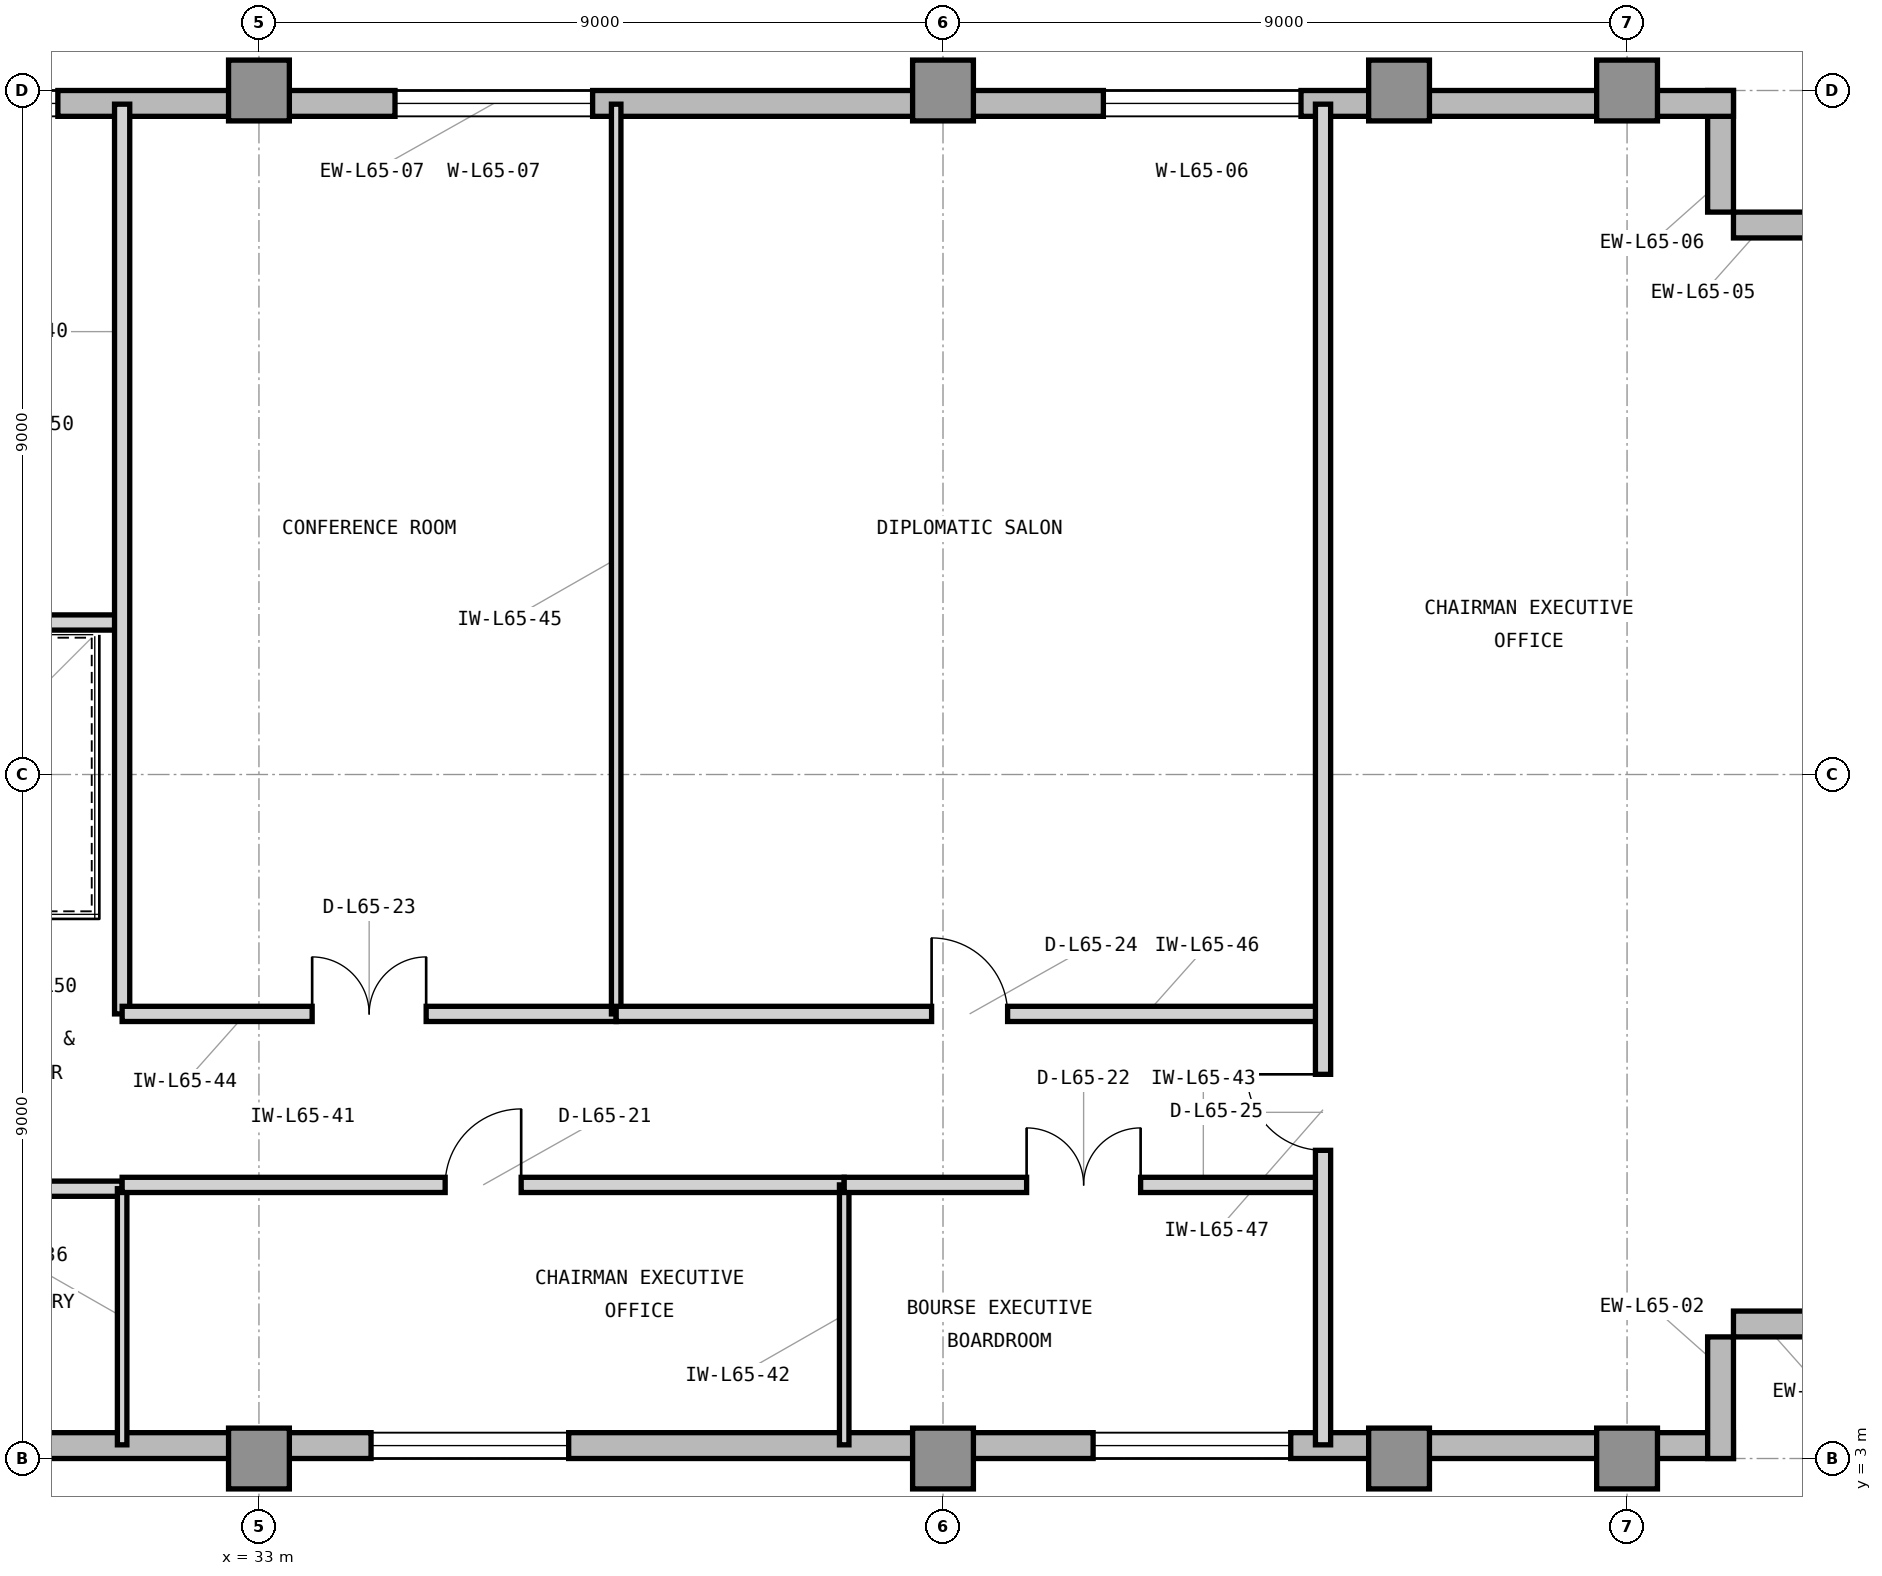
"""IFC4 building model, lengths in metres.
Left out: names, types, materials, properties, quantities, classifications, styles, units other than length and angle.
Written with IfcOpenShell. Run it as: python <this file> out.ifc"""

import sys

from ifc_helpers import new_model, si_unit, direction, frame, frame_2d, origin, origin_2d, place, context, subcontext, project, spatial, rectangle, extrude, element, fill, save


model = new_model("IFC4")
c1 = context("Model", 3, precision=1e-05, world=origin(), true_north=direction((0.0, 1.0)))
c2 = subcontext(c1, "Body", "Model", "MODEL_VIEW")
j1 = project(units=[si_unit("LENGTHUNIT", "METRE"), si_unit("PLANEANGLEUNIT", "RADIAN")], contexts=[c1])
p1 = place(None, origin())
s1 = spatial("IfcSite", under=j1, at=p1, CompositionType="ELEMENT")
p2 = place(p1, origin())
s2 = spatial("IfcBuilding", under=s1, at=p2, CompositionType="ELEMENT")
p3 = place(p2, frame((0.0, 0.0, 266.4)))
s3 = spatial("IfcBuildingStorey", under=s2, at=p3, CompositionType="ELEMENT", Elevation=266.4)
for number, where, z_axis, x_axis in (
    (1, (33.0, 3.0, 0.0), (0.0, 0.0, 1.0), (1.0, 0.0, 0.0)),
    (2, (33.0, 21.0, 0.0), (0.0, 0.0, 1.0), (1.0, 0.0, 0.0)),
    (3, (42.0, 3.0, 0.0), (0.0, 0.0, 1.0), (1.0, 0.0, 0.0)),
    (4, (42.0, 21.0, 0.0), (0.0, 0.0, 1.0), (1.0, 0.0, 0.0)),
    (5, (48.0, 3.0, 0.0), (0.0, 0.0, 1.0), (1.0, 0.0, 0.0)),
    (6, (48.0, 21.0, 0.0), (0.0, 0.0, 1.0), (1.0, 0.0, 0.0)),
    (7, (51.0, 3.0, 0.0), (0.0, 0.0, 1.0), (1.0, 0.0, 0.0)),
    (8, (51.0, 21.0, 0.0), (0.0, 0.0, 1.0), (1.0, 0.0, 0.0)),
):
    element("IfcColumn", number, at=place(p3, frame(where, z_axis=z_axis, x_axis=x_axis)), inside=s3, PredefinedType="COLUMN", context=c2, shape_type="SweptSolid", body=[
        extrude(rectangle(XDim=0.8, YDim=0.8, at=origin_2d()), origin(), (0.0, 0.0, 1.0), 3.9),
    ])
p4 = place(p3, frame((23.9, 3.17, 0.0), z_axis=(0.0, 0.0, 1.0), x_axis=(1.0, 0.0, 0.0)))
e9 = element("IfcWall", 9, at=p4, inside=s3, PredefinedType="STANDARD", context=c2, shape_type="SweptSolid", body=[
    extrude(rectangle(XDim=28.5, YDim=0.34, at=frame_2d((14.25, 0.0))), origin(), (0.0, 0.0, 1.0), 3.715),
])
p5 = place(p4, frame((1.425, 0.0, 0.8)))
e10 = element("IfcOpeningElement", 10, at=p5, cuts=e9, PredefinedType="OPENING", context=c2, shape_type="SweptSolid", body=[
    extrude(rectangle(XDim=1.9, YDim=2.35, at=frame_2d((0.95, 1.175))), frame((0.0, 0.18, 0.0), z_axis=(0.0, -1.0, 0.0), x_axis=(1.0, 0.0, 0.0)), (0.0, 0.0, 1.0), 0.36),
])
p6 = place(p4, frame((10.575, 0.0, 0.8)))
e11 = element("IfcOpeningElement", 11, at=p6, cuts=e9, PredefinedType="OPENING", context=c2, shape_type="SweptSolid", body=[
    extrude(rectangle(XDim=2.6, YDim=2.35, at=frame_2d((1.3, 1.175))), frame((0.0, 0.18, 0.0), z_axis=(0.0, -1.0, 0.0), x_axis=(1.0, 0.0, 0.0)), (0.0, 0.0, 1.0), 0.36),
])
p7 = place(p4, frame((20.075, 0.0, 0.8)))
e12 = element("IfcOpeningElement", 12, at=p7, cuts=e9, PredefinedType="OPENING", context=c2, shape_type="SweptSolid", body=[
    extrude(rectangle(XDim=2.6, YDim=2.35, at=frame_2d((1.3, 1.175))), frame((0.0, 0.18, 0.0), z_axis=(0.0, -1.0, 0.0), x_axis=(1.0, 0.0, 0.0)), (0.0, 0.0, 1.0), 0.36),
])
for number, where, z_axis, x_axis in (
    (13, (52.23, 3.0, 0.0), (0.0, 0.0, 1.0), (0.0, 1.0, 0.0)),
    (14, (52.4, 4.77, 0.0), (0.0, 0.0, 1.0), (1.0, 0.0, 0.0)),
    (15, (54.0, 19.23, 0.0), (0.0, 0.0, 1.0), (-1.0, 0.0, 0.0)),
    (16, (52.23, 19.4, 0.0), (0.0, 0.0, 1.0), (0.0, 1.0, 0.0)),
):
    element("IfcWall", number, at=place(p3, frame(where, z_axis=z_axis, x_axis=x_axis)), inside=s3, PredefinedType="STANDARD", context=c2, shape_type="SweptSolid", body=[
        extrude(rectangle(XDim=1.6, YDim=0.34, at=frame_2d((0.8, 0.0))), origin(), (0.0, 0.0, 1.0), 3.715),
    ])
p8 = place(p3, frame((52.4, 20.83, 0.0), z_axis=(0.0, 0.0, 1.0), x_axis=(-1.0, 0.0, 0.0)))
e17 = element("IfcWall", 17, at=p8, inside=s3, PredefinedType="STANDARD", context=c2, shape_type="SweptSolid", body=[
    extrude(rectangle(XDim=32.62, YDim=0.34, at=frame_2d((16.31, 0.0))), origin(), (0.0, 0.0, 1.0), 3.715),
])
p9 = place(p8, frame((5.69, 0.0, 0.8)))
e18 = element("IfcOpeningElement", 18, at=p9, cuts=e17, PredefinedType="OPENING", context=c2, shape_type="SweptSolid", body=[
    extrude(rectangle(XDim=2.6, YDim=2.35, at=frame_2d((1.3, 1.175))), frame((0.0, 0.18, 0.0), z_axis=(0.0, -1.0, 0.0), x_axis=(1.0, 0.0, 0.0)), (0.0, 0.0, 1.0), 0.36),
])
p10 = place(p8, frame((15.01, 0.0, 0.8)))
e19 = element("IfcOpeningElement", 19, at=p10, cuts=e17, PredefinedType="OPENING", context=c2, shape_type="SweptSolid", body=[
    extrude(rectangle(XDim=2.6, YDim=2.35, at=frame_2d((1.3, 1.175))), frame((0.0, 0.18, 0.0), z_axis=(0.0, -1.0, 0.0), x_axis=(1.0, 0.0, 0.0)), (0.0, 0.0, 1.0), 0.36),
])
p11 = place(p8, frame((26.226, 0.0, 0.8)))
e20 = element("IfcOpeningElement", 20, at=p11, cuts=e17, PredefinedType="OPENING", context=c2, shape_type="SweptSolid", body=[
    extrude(rectangle(XDim=1.2, YDim=2.35, at=frame_2d((0.6, 1.175))), frame((0.0, 0.18, 0.0), z_axis=(0.0, -1.0, 0.0), x_axis=(1.0, 0.0, 0.0)), (0.0, 0.0, 1.0), 0.36),
])
p12 = place(p8, frame((22.046, 0.0, 0.8)))
e21 = element("IfcOpeningElement", 21, at=p12, cuts=e17, PredefinedType="OPENING", context=c2, shape_type="SweptSolid", body=[
    extrude(rectangle(XDim=2.6, YDim=2.35, at=frame_2d((1.3, 1.175))), frame((0.0, 0.18, 0.0), z_axis=(0.0, -1.0, 0.0), x_axis=(1.0, 0.0, 0.0)), (0.0, 0.0, 1.0), 0.36),
])
p13 = place(p3, frame((23.85, 6.55, 0.0), z_axis=(0.0, 0.0, 1.0), x_axis=(1.0, 0.0, 0.0)))
e22 = element("IfcWall", 22, at=p13, inside=s3, PredefinedType="PARTITIONING", context=c2, shape_type="SweptSolid", body=[
    extrude(rectangle(XDim=7.35, YDim=0.2, at=frame_2d((3.675, 0.0))), origin(), (0.0, 0.0, 1.0), 3.705),
])
p14 = place(p13, frame((2.8, 0.0, 0.0)))
e23 = element("IfcOpeningElement", 23, at=p14, cuts=e22, PredefinedType="OPENING", context=c2, shape_type="SweptSolid", body=[
    extrude(rectangle(XDim=1.0, YDim=2.15, at=frame_2d((0.5, 1.075))), frame((0.0, 0.11, 0.0), z_axis=(0.0, -1.0, 0.0), x_axis=(1.0, 0.0, 0.0)), (0.0, 0.0, 1.0), 0.22),
])
p15 = place(p3, frame((31.2, 3.18, 0.0), z_axis=(0.0, 0.0, 1.0), x_axis=(0.0, 1.0, 0.0)))
e24 = element("IfcWall", 24, at=p15, inside=s3, PredefinedType="PARTITIONING", context=c2, shape_type="SweptSolid", body=[
    extrude(rectangle(XDim=3.37, YDim=0.125, at=frame_2d((1.685, 0.0))), origin(), (0.0, 0.0, 1.0), 3.705),
])
p16 = place(p3, frame((26.9, 14.0, 0.0), z_axis=(0.0, 0.0, 1.0), x_axis=(1.0, 0.0, 0.0)))
e25 = element("IfcWall", 25, at=p16, inside=s3, PredefinedType="PARTITIONING", context=c2, shape_type="SweptSolid", body=[
    extrude(rectangle(XDim=4.3, YDim=0.2, at=frame_2d((2.15, 0.0))), origin(), (0.0, 0.0, 1.0), 3.705),
])
p17 = place(p3, frame((31.2, 8.85, 0.0), z_axis=(0.0, 0.0, 1.0), x_axis=(0.0, 1.0, 0.0)))
e26 = element("IfcWall", 26, at=p17, inside=s3, PredefinedType="PARTITIONING", context=c2, shape_type="SweptSolid", body=[
    extrude(rectangle(XDim=11.97, YDim=0.2, at=frame_2d((5.985, 0.0))), origin(), (0.0, 0.0, 1.0), 3.705),
])
p18 = place(p3, frame((31.2, 6.6, 0.0), z_axis=(0.0, 0.0, 1.0), x_axis=(1.0, 0.0, 0.0)))
e27 = element("IfcWall", 27, at=p18, inside=s3, PredefinedType="PARTITIONING", context=c2, shape_type="SweptSolid", body=[
    extrude(rectangle(XDim=9.5, YDim=0.2, at=frame_2d((4.75, 0.0))), origin(), (0.0, 0.0, 1.0), 3.705),
])
p19 = place(p18, frame((4.25, 0.0, 0.0)))
e28 = element("IfcOpeningElement", 28, at=p19, cuts=e27, PredefinedType="OPENING", context=c2, shape_type="SweptSolid", body=[
    extrude(rectangle(XDim=1.0, YDim=2.15, at=frame_2d((0.5, 1.075))), frame((0.0, 0.11, 0.0), z_axis=(0.0, -1.0, 0.0), x_axis=(1.0, 0.0, 0.0)), (0.0, 0.0, 1.0), 0.22),
])
p20 = place(p3, frame((40.7, 3.18, 0.0), z_axis=(0.0, 0.0, 1.0), x_axis=(0.0, 1.0, 0.0)))
e29 = element("IfcWall", 29, at=p20, inside=s3, PredefinedType="PARTITIONING", context=c2, shape_type="SweptSolid", body=[
    extrude(rectangle(XDim=3.42, YDim=0.125, at=frame_2d((1.71, 0.0))), origin(), (0.0, 0.0, 1.0), 3.705),
])
p21 = place(p3, frame((40.7, 6.6, 0.0), z_axis=(0.0, 0.0, 1.0), x_axis=(1.0, 0.0, 0.0)))
e30 = element("IfcWall", 30, at=p21, inside=s3, PredefinedType="PARTITIONING", context=c2, shape_type="SweptSolid", body=[
    extrude(rectangle(XDim=6.3, YDim=0.2, at=frame_2d((3.15, 0.0))), origin(), (0.0, 0.0, 1.0), 3.705),
])
p22 = place(p21, frame((2.4, 0.0, 0.0)))
e31 = element("IfcOpeningElement", 31, at=p22, cuts=e30, PredefinedType="OPENING", context=c2, shape_type="SweptSolid", body=[
    extrude(rectangle(XDim=1.5, YDim=2.3, at=frame_2d((0.75, 1.15))), frame((0.0, 0.11, 0.0), z_axis=(0.0, -1.0, 0.0), x_axis=(1.0, 0.0, 0.0)), (0.0, 0.0, 1.0), 0.22),
])
p23 = place(p3, frame((31.2, 8.85, 0.0), z_axis=(0.0, 0.0, 1.0), x_axis=(1.0, 0.0, 0.0)))
e32 = element("IfcWall", 32, at=p23, inside=s3, PredefinedType="PARTITIONING", context=c2, shape_type="SweptSolid", body=[
    extrude(rectangle(XDim=6.5, YDim=0.2, at=frame_2d((3.25, 0.0))), origin(), (0.0, 0.0, 1.0), 3.705),
])
p24 = place(p23, frame((2.5, 0.0, 0.0)))
e33 = element("IfcOpeningElement", 33, at=p24, cuts=e32, PredefinedType="OPENING", context=c2, shape_type="SweptSolid", body=[
    extrude(rectangle(XDim=1.5, YDim=2.3, at=frame_2d((0.75, 1.15))), frame((0.0, 0.11, 0.0), z_axis=(0.0, -1.0, 0.0), x_axis=(1.0, 0.0, 0.0)), (0.0, 0.0, 1.0), 0.22),
])
p25 = place(p3, frame((37.7, 8.85, 0.0), z_axis=(0.0, 0.0, 1.0), x_axis=(0.0, 1.0, 0.0)))
e34 = element("IfcWall", 34, at=p25, inside=s3, PredefinedType="PARTITIONING", context=c2, shape_type="SweptSolid", body=[
    extrude(rectangle(XDim=11.97, YDim=0.125, at=frame_2d((5.985, 0.0))), origin(), (0.0, 0.0, 1.0), 3.705),
])
p26 = place(p3, frame((37.7, 8.85, 0.0), z_axis=(0.0, 0.0, 1.0), x_axis=(1.0, 0.0, 0.0)))
e35 = element("IfcWall", 35, at=p26, inside=s3, PredefinedType="PARTITIONING", context=c2, shape_type="SweptSolid", body=[
    extrude(rectangle(XDim=9.3, YDim=0.2, at=frame_2d((4.65, 0.0))), origin(), (0.0, 0.0, 1.0), 3.705),
])
p27 = place(p26, frame((4.15, 0.0, 0.0)))
e36 = element("IfcOpeningElement", 36, at=p27, cuts=e35, PredefinedType="OPENING", context=c2, shape_type="SweptSolid", body=[
    extrude(rectangle(XDim=1.0, YDim=2.15, at=frame_2d((0.5, 1.075))), frame((0.0, 0.11, 0.0), z_axis=(0.0, -1.0, 0.0), x_axis=(1.0, 0.0, 0.0)), (0.0, 0.0, 1.0), 0.22),
])
p28 = place(p3, frame((47.0, 3.18, 0.0), z_axis=(0.0, 0.0, 1.0), x_axis=(0.0, 1.0, 0.0)))
e37 = element("IfcWall", 37, at=p28, inside=s3, PredefinedType="PARTITIONING", context=c2, shape_type="SweptSolid", body=[
    extrude(rectangle(XDim=17.64, YDim=0.2, at=frame_2d((8.82, 0.0))), origin(), (0.0, 0.0, 1.0), 3.705),
])
p29 = place(p28, frame((3.875, 0.0, 0.0)))
e38 = element("IfcOpeningElement", 38, at=p29, cuts=e37, PredefinedType="OPENING", context=c2, shape_type="SweptSolid", body=[
    extrude(rectangle(XDim=1.0, YDim=2.15, at=frame_2d((0.5, 1.075))), frame((0.0, 0.11, 0.0), z_axis=(0.0, -1.0, 0.0), x_axis=(1.0, 0.0, 0.0)), (0.0, 0.0, 1.0), 0.22),
])
p30 = place(p6, origin())
e39 = element("IfcWindow", 39, at=p30, inside=s3, PartitioningType="SINGLE_PANEL", PredefinedType="WINDOW", context=c2, shape_type="SweptSolid", body=[
    extrude(rectangle(XDim=2.6, YDim=2.35, at=frame_2d((1.3, 1.175))), frame((0.0, 0.11, 0.0), z_axis=(0.0, -1.0, 0.0), x_axis=(1.0, 0.0, 0.0)), (0.0, 0.0, 1.0), 0.06),
])
fill(e11, e39)
p31 = place(p7, origin())
e40 = element("IfcWindow", 40, at=p31, inside=s3, PartitioningType="SINGLE_PANEL", PredefinedType="WINDOW", context=c2, shape_type="SweptSolid", body=[
    extrude(rectangle(XDim=2.6, YDim=2.35, at=frame_2d((1.3, 1.175))), frame((0.0, 0.11, 0.0), z_axis=(0.0, -1.0, 0.0), x_axis=(1.0, 0.0, 0.0)), (0.0, 0.0, 1.0), 0.06),
])
fill(e12, e40)
p32 = place(p9, origin())
e41 = element("IfcWindow", 41, at=p32, inside=s3, PartitioningType="SINGLE_PANEL", PredefinedType="WINDOW", context=c2, shape_type="SweptSolid", body=[
    extrude(rectangle(XDim=2.6, YDim=2.35, at=frame_2d((1.3, 1.175))), frame((0.0, 0.11, 0.0), z_axis=(0.0, -1.0, 0.0), x_axis=(1.0, 0.0, 0.0)), (0.0, 0.0, 1.0), 0.06),
])
fill(e18, e41)
p33 = place(p10, origin())
e42 = element("IfcWindow", 42, at=p33, inside=s3, PartitioningType="SINGLE_PANEL", PredefinedType="WINDOW", context=c2, shape_type="SweptSolid", body=[
    extrude(rectangle(XDim=2.6, YDim=2.35, at=frame_2d((1.3, 1.175))), frame((0.0, 0.11, 0.0), z_axis=(0.0, -1.0, 0.0), x_axis=(1.0, 0.0, 0.0)), (0.0, 0.0, 1.0), 0.06),
])
fill(e19, e42)
p34 = place(p19, origin())
e43 = element("IfcDoor", 43, at=p34, inside=s3, OperationType="SINGLE_SWING_RIGHT", PredefinedType="DOOR", context=c2, shape_type="SweptSolid", body=[
    extrude(rectangle(XDim=1.0, YDim=2.15, at=frame_2d((0.5, 1.075))), frame((0.0, 0.025, 0.0), z_axis=(0.0, -1.0, 0.0), x_axis=(1.0, 0.0, 0.0)), (0.0, 0.0, 1.0), 0.05),
])
fill(e28, e43)
p35 = place(p22, origin())
e44 = element("IfcDoor", 44, at=p35, inside=s3, OperationType="DOUBLE_DOOR_SINGLE_SWING", PredefinedType="DOOR", context=c2, shape_type="SweptSolid", body=[
    extrude(rectangle(XDim=1.5, YDim=2.3, at=frame_2d((0.75, 1.15))), frame((0.0, 0.025, 0.0), z_axis=(0.0, -1.0, 0.0), x_axis=(1.0, 0.0, 0.0)), (0.0, 0.0, 1.0), 0.05),
])
fill(e31, e44)
p36 = place(p24, origin())
e45 = element("IfcDoor", 45, at=p36, inside=s3, OperationType="DOUBLE_DOOR_SINGLE_SWING", PredefinedType="DOOR", context=c2, shape_type="SweptSolid", body=[
    extrude(rectangle(XDim=1.5, YDim=2.3, at=frame_2d((0.75, 1.15))), frame((0.0, 0.025, 0.0), z_axis=(0.0, -1.0, 0.0), x_axis=(1.0, 0.0, 0.0)), (0.0, 0.0, 1.0), 0.05),
])
fill(e33, e45)
p37 = place(p27, origin())
e46 = element("IfcDoor", 46, at=p37, inside=s3, OperationType="SINGLE_SWING_LEFT", PredefinedType="DOOR", context=c2, shape_type="SweptSolid", body=[
    extrude(rectangle(XDim=1.0, YDim=2.15, at=frame_2d((0.5, 1.075))), frame((0.0, 0.025, 0.0), z_axis=(0.0, -1.0, 0.0), x_axis=(1.0, 0.0, 0.0)), (0.0, 0.0, 1.0), 0.05),
])
fill(e36, e46)
p38 = place(p29, origin())
e47 = element("IfcDoor", 47, at=p38, inside=s3, OperationType="SINGLE_SWING_RIGHT", PredefinedType="DOOR", context=c2, shape_type="SweptSolid", body=[
    extrude(rectangle(XDim=1.0, YDim=2.15, at=frame_2d((0.5, 1.075))), frame((0.0, 0.025, 0.0), z_axis=(0.0, -1.0, 0.0), x_axis=(1.0, 0.0, 0.0)), (0.0, 0.0, 1.0), 0.05),
])
fill(e38, e47)
p39 = place(p12, origin())
e48 = element("IfcWindow", 48, at=p39, inside=s3, PartitioningType="SINGLE_PANEL", PredefinedType="WINDOW", context=c2, shape_type="SweptSolid", body=[
    extrude(rectangle(XDim=2.6, YDim=2.35, at=frame_2d((1.3, 1.175))), frame((0.0, 0.11, 0.0), z_axis=(0.0, -1.0, 0.0), x_axis=(1.0, 0.0, 0.0)), (0.0, 0.0, 1.0), 0.06),
])
fill(e21, e48)
save(model, sys.argv[1])
